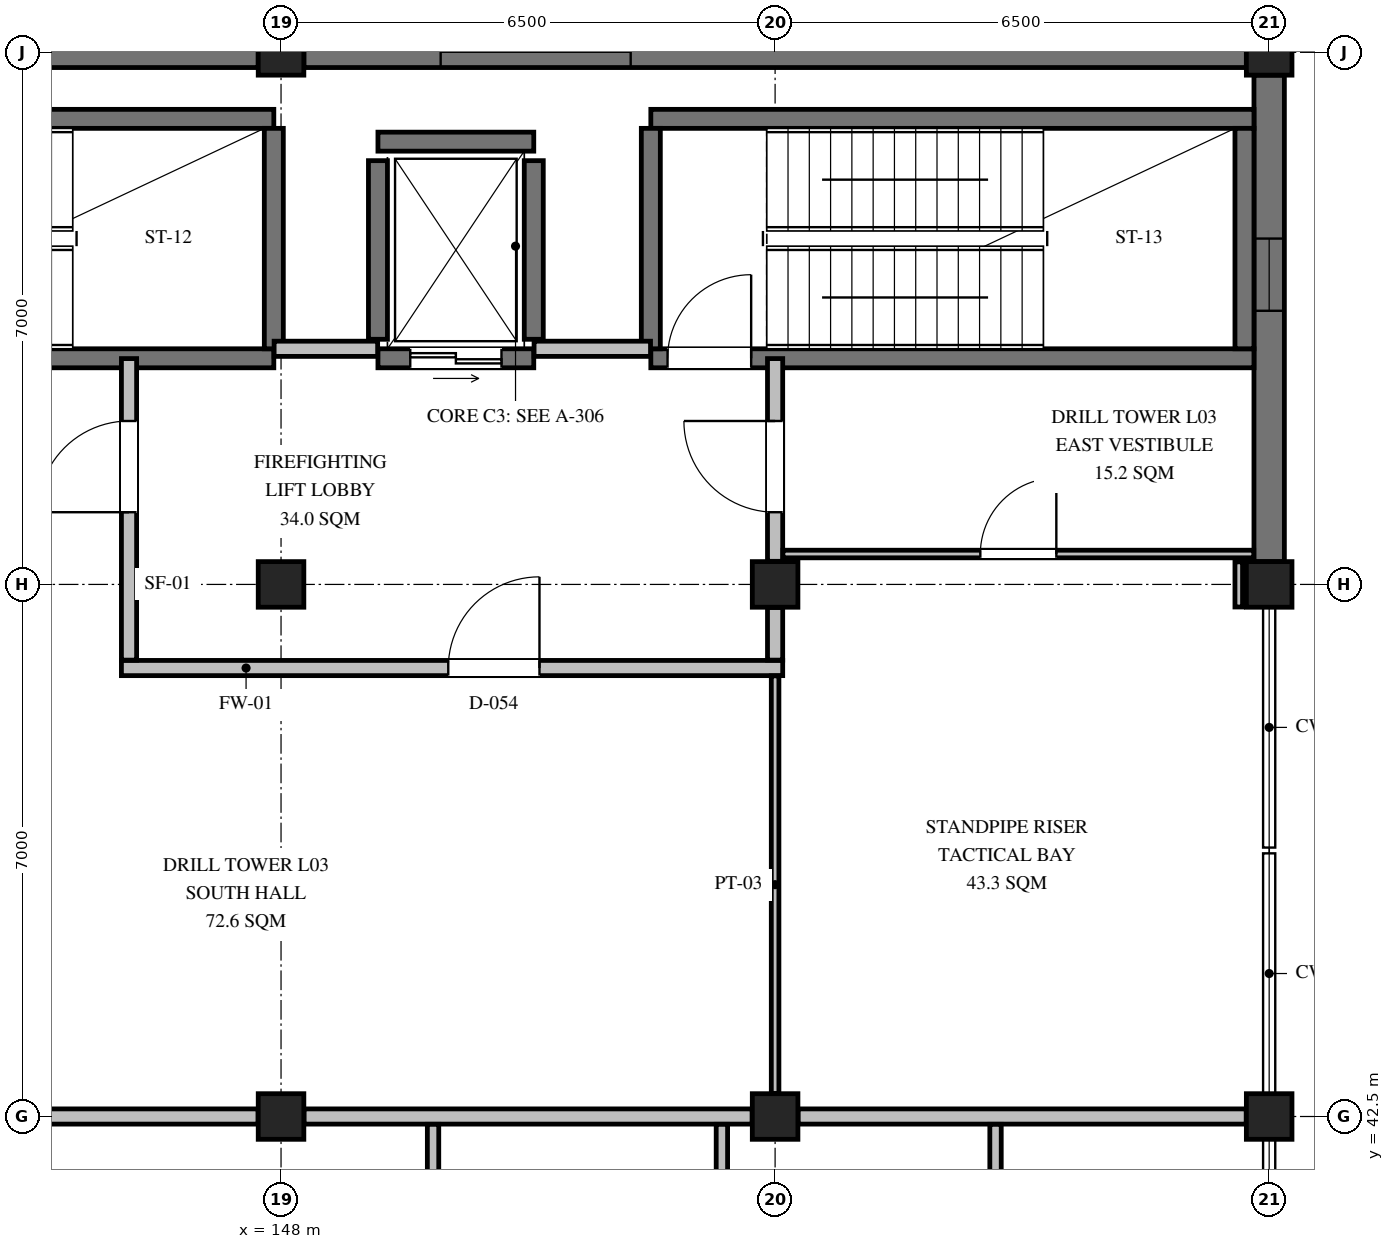
"""IFC4 building model, lengths in metres.
Left out: names, types, materials, properties, quantities, classifications, styles, units other than length and angle.
Written with IfcOpenShell. Run it as: python <this file> out.ifc"""

import sys

from ifc_helpers import new_model, si_unit, direction, frame, frame_2d, origin, origin_2d, place, context, subcontext, project, spatial, rectangle, extrude, element, fill, save


model = new_model("IFC4")
c1 = context("Model", 3, precision=1e-05, world=origin(), true_north=direction((0.0, 1.0)))
c2 = subcontext(c1, "Body", "Model", "MODEL_VIEW")
j1 = project(units=[si_unit("LENGTHUNIT", "METRE"), si_unit("PLANEANGLEUNIT", "RADIAN")], contexts=[c1])
p1 = place(None, origin())
s1 = spatial("IfcSite", under=j1, at=p1, CompositionType="ELEMENT")
p2 = place(p1, origin())
s2 = spatial("IfcBuilding", under=s1, at=p2, CompositionType="ELEMENT")
p3 = place(p2, frame((0.0, 0.0, 10.05)))
s3 = spatial("IfcBuildingStorey", under=s2, at=p3, CompositionType="ELEMENT", Elevation=10.05)
for number, where, z_axis, x_axis in (
    (1, (148.0, 42.5, 0.0), (0.0, 0.0, 1.0), (1.0, 0.0, 0.0)),
    (2, (148.0, 49.5, 0.0), (0.0, 0.0, 1.0), (1.0, 0.0, 0.0)),
    (3, (148.0, 56.5, 0.0), (0.0, 0.0, 1.0), (1.0, 0.0, 0.0)),
    (4, (154.5, 42.5, 0.0), (0.0, 0.0, 1.0), (1.0, 0.0, 0.0)),
    (5, (154.5, 49.5, 0.0), (0.0, 0.0, 1.0), (1.0, 0.0, 0.0)),
    (6, (161.0, 42.5, 0.0), (0.0, 0.0, 1.0), (1.0, 0.0, 0.0)),
    (7, (161.0, 49.5, 0.0), (0.0, 0.0, 1.0), (1.0, 0.0, 0.0)),
    (8, (161.0, 56.5, 0.0), (0.0, 0.0, 1.0), (1.0, 0.0, 0.0)),
):
    element("IfcColumn", number, at=place(p3, frame(where, z_axis=z_axis, x_axis=x_axis)), inside=s3, PredefinedType="COLUMN", context=c2, shape_type="SweptSolid", body=[
        extrude(rectangle(XDim=0.6, YDim=0.6, at=origin_2d()), origin(), (0.0, 0.0, 1.0), 4.2),
    ])
p4 = place(p3, frame((140.3, 56.5, 0.0), z_axis=(0.0, 0.0, 1.0), x_axis=(1.0, 0.0, 0.0)))
e9 = element("IfcWall", 9, at=p4, inside=s3, PredefinedType="SHEAR", context=c2, shape_type="SweptSolid", body=[
    extrude(rectangle(XDim=7.4, YDim=0.4, at=frame_2d((3.7, 0.0))), origin(), (0.0, 0.0, 1.0), 4.0),
])
p5 = place(p4, frame((1.8, 0.0, 0.9)))
e10 = element("IfcOpeningElement", 10, at=p5, cuts=e9, PredefinedType="OPENING", context=c2, shape_type="SweptSolid", body=[
    extrude(rectangle(XDim=2.1, YDim=2.1, at=frame_2d((1.05, 1.05))), frame((0.0, 0.21, 0.0), z_axis=(0.0, -1.0, 0.0), x_axis=(1.0, 0.0, 0.0)), (0.0, 0.0, 1.0), 0.42),
])
p6 = place(p3, frame((148.3, 56.5, 0.0), z_axis=(0.0, 0.0, 1.0), x_axis=(1.0, 0.0, 0.0)))
e11 = element("IfcWall", 11, at=p6, inside=s3, PredefinedType="SHEAR", context=c2, shape_type="SweptSolid", body=[
    extrude(rectangle(XDim=12.4, YDim=0.4, at=frame_2d((6.2, 0.0))), origin(), (0.0, 0.0, 1.0), 4.0),
])
p7 = place(p6, frame((1.8, 0.0, 0.9)))
e12 = element("IfcOpeningElement", 12, at=p7, cuts=e11, PredefinedType="OPENING", context=c2, shape_type="SweptSolid", body=[
    extrude(rectangle(XDim=2.5, YDim=2.1, at=frame_2d((1.25, 1.05))), frame((0.0, 0.21, 0.0), z_axis=(0.0, -1.0, 0.0), x_axis=(1.0, 0.0, 0.0)), (0.0, 0.0, 1.0), 0.42),
])
p8 = place(p3, frame((161.0, 49.8, 0.0), z_axis=(0.0, 0.0, 1.0), x_axis=(0.0, 1.0, 0.0)))
e13 = element("IfcWall", 13, at=p8, inside=s3, PredefinedType="SHEAR", context=c2, shape_type="SweptSolid", body=[
    extrude(rectangle(XDim=6.4, YDim=0.4, at=frame_2d((3.2, 0.0))), origin(), (0.0, 0.0, 1.0), 4.0),
])
p9 = place(p8, frame((3.3, 0.0, 1.1)))
e14 = element("IfcOpeningElement", 14, at=p9, cuts=e13, PredefinedType="OPENING", context=c2, shape_type="SweptSolid", body=[
    extrude(rectangle(XDim=0.95, YDim=0.95, at=frame_2d((0.475, 0.475))), frame((0.0, 0.21, 0.0), z_axis=(0.0, -1.0, 0.0), x_axis=(1.0, 0.0, 0.0)), (0.0, 0.0, 1.0), 0.42),
])
p10 = place(p3, frame((140.095, 52.475, 0.0), z_axis=(0.0, 0.0, 1.0), x_axis=(1.0, 0.0, 0.0)))
e15 = element("IfcWall", 15, at=p10, inside=s3, PredefinedType="SHEAR", context=c2, shape_type="SweptSolid", body=[
    extrude(rectangle(XDim=7.81, YDim=0.25, at=frame_2d((3.905, 0.0))), origin(), (0.0, 0.0, 1.0), 4.0),
])
p11 = place(p10, frame((0.22, 0.0, 0.0)))
e16 = element("IfcOpeningElement", 16, at=p11, cuts=e15, PredefinedType="OPENING", context=c2, shape_type="SweptSolid", body=[
    extrude(rectangle(XDim=1.1, YDim=2.15, at=frame_2d((0.55, 1.075))), frame((0.0, 0.135, 0.0), z_axis=(0.0, -1.0, 0.0), x_axis=(1.0, 0.0, 0.0)), (0.0, 0.0, 1.0), 0.27),
])
p12 = place(p3, frame((140.095, 55.625, 0.0), z_axis=(0.0, 0.0, 1.0), x_axis=(1.0, 0.0, 0.0)))
e17 = element("IfcWall", 17, at=p12, inside=s3, PredefinedType="SHEAR", context=c2, shape_type="SweptSolid", body=[
    extrude(rectangle(XDim=7.81, YDim=0.25, at=frame_2d((3.905, 0.0))), origin(), (0.0, 0.0, 1.0), 4.0),
])
p13 = place(p3, frame((147.905, 52.6, 0.0), z_axis=(0.0, 0.0, 1.0), x_axis=(0.0, 1.0, 0.0)))
e18 = element("IfcWall", 18, at=p13, inside=s3, PredefinedType="SHEAR", context=c2, shape_type="SweptSolid", body=[
    extrude(rectangle(XDim=2.9, YDim=0.25, at=frame_2d((1.45, 0.0))), origin(), (0.0, 0.0, 1.0), 4.0),
])
p14 = place(p3, frame((152.865, 52.475, 0.0), z_axis=(0.0, 0.0, 1.0), x_axis=(1.0, 0.0, 0.0)))
e19 = element("IfcWall", 19, at=p14, inside=s3, PredefinedType="SHEAR", context=c2, shape_type="SweptSolid", body=[
    extrude(rectangle(XDim=7.935, YDim=0.25, at=frame_2d((3.968, 0.0))), origin(), (0.0, 0.0, 1.0), 4.0),
])
p15 = place(p14, frame((0.22, 0.0, 0.0)))
e20 = element("IfcOpeningElement", 20, at=p15, cuts=e19, PredefinedType="OPENING", context=c2, shape_type="SweptSolid", body=[
    extrude(rectangle(XDim=1.1, YDim=2.15, at=frame_2d((0.55, 1.075))), frame((0.0, 0.135, 0.0), z_axis=(0.0, -1.0, 0.0), x_axis=(1.0, 0.0, 0.0)), (0.0, 0.0, 1.0), 0.27),
])
p16 = place(p3, frame((152.865, 55.625, 0.0), z_axis=(0.0, 0.0, 1.0), x_axis=(1.0, 0.0, 0.0)))
e21 = element("IfcWall", 21, at=p16, inside=s3, PredefinedType="SHEAR", context=c2, shape_type="SweptSolid", body=[
    extrude(rectangle(XDim=7.935, YDim=0.25, at=frame_2d((3.968, 0.0))), origin(), (0.0, 0.0, 1.0), 4.0),
])
for number, where, z_axis, x_axis in (
    (22, (152.865, 52.6, 0.0), (0.0, 0.0, 1.0), (0.0, 1.0, 0.0)),
    (23, (160.675, 52.6, 0.0), (0.0, 0.0, 1.0), (0.0, 1.0, 0.0)),
):
    element("IfcWall", number, at=place(p3, frame(where, z_axis=z_axis, x_axis=x_axis)), inside=s3, PredefinedType="SHEAR", context=c2, shape_type="SweptSolid", body=[
        extrude(rectangle(XDim=2.9, YDim=0.25, at=frame_2d((1.45, 0.0))), origin(), (0.0, 0.0, 1.0), 4.0),
    ])
p17 = place(p3, frame((149.275, 52.475, 0.0), z_axis=(0.0, 0.0, 1.0), x_axis=(1.0, 0.0, 0.0)))
e24 = element("IfcWall", 24, at=p17, inside=s3, PredefinedType="SHEAR", context=c2, shape_type="SweptSolid", body=[
    extrude(rectangle(XDim=2.05, YDim=0.25, at=frame_2d((1.025, 0.0))), origin(), (0.0, 0.0, 1.0), 4.0),
])
p18 = place(p17, frame((0.425, 0.0, 0.0)))
e25 = element("IfcOpeningElement", 25, at=p18, cuts=e24, PredefinedType="OPENING", context=c2, shape_type="SweptSolid", body=[
    extrude(rectangle(XDim=1.2, YDim=2.15, at=frame_2d((0.6, 1.075))), frame((0.0, 0.135, 0.0), z_axis=(0.0, -1.0, 0.0), x_axis=(1.0, 0.0, 0.0)), (0.0, 0.0, 1.0), 0.27),
])
p19 = place(p3, frame((149.275, 55.325, 0.0), z_axis=(0.0, 0.0, 1.0), x_axis=(1.0, 0.0, 0.0)))
e26 = element("IfcWall", 26, at=p19, inside=s3, PredefinedType="SHEAR", context=c2, shape_type="SweptSolid", body=[
    extrude(rectangle(XDim=2.05, YDim=0.25, at=frame_2d((1.025, 0.0))), origin(), (0.0, 0.0, 1.0), 4.0),
])
for number, where, z_axis, x_axis in (
    (27, (149.275, 52.725, 0.0), (0.0, 0.0, 1.0), (0.0, 1.0, 0.0)),
    (28, (151.325, 52.725, 0.0), (0.0, 0.0, 1.0), (0.0, 1.0, 0.0)),
):
    element("IfcWall", number, at=place(p3, frame(where, z_axis=z_axis, x_axis=x_axis)), inside=s3, PredefinedType="SHEAR", context=c2, shape_type="SweptSolid", body=[
        extrude(rectangle(XDim=2.35, YDim=0.25, at=frame_2d((1.175, 0.0))), origin(), (0.0, 0.0, 1.0), 4.0),
    ])
p20 = place(p3, frame((140.302, 42.5, 0.0), z_axis=(0.0, 0.0, 1.0), x_axis=(1.0, 0.0, 0.0)))
e29 = element("IfcWall", 29, at=p20, inside=s3, PredefinedType="PARTITIONING", context=c2, shape_type="SweptSolid", body=[
    extrude(rectangle(XDim=7.396, YDim=0.2, at=frame_2d((3.698, 0.0))), origin(), (0.0, 0.0, 1.0), 3.494),
])
p21 = place(p20, frame((3.298, 0.0, 0.0)))
e30 = element("IfcOpeningElement", 30, at=p21, cuts=e29, PredefinedType="OPENING", context=c2, shape_type="SweptSolid", body=[
    extrude(rectangle(XDim=1.2, YDim=2.15, at=frame_2d((0.6, 1.075))), frame((0.0, 0.11, 0.0), z_axis=(0.0, -1.0, 0.0), x_axis=(1.0, 0.0, 0.0)), (0.0, 0.0, 1.0), 0.22),
])
p22 = place(p3, frame((148.302, 42.5, 0.0), z_axis=(0.0, 0.0, 1.0), x_axis=(1.0, 0.0, 0.0)))
e31 = element("IfcWall", 31, at=p22, inside=s3, PredefinedType="PARTITIONING", context=c2, shape_type="SweptSolid", body=[
    extrude(rectangle(XDim=5.896, YDim=0.2, at=frame_2d((2.948, 0.0))), origin(), (0.0, 0.0, 1.0), 3.554),
])
p23 = place(p3, frame((154.802, 42.5, 0.0), z_axis=(0.0, 0.0, 1.0), x_axis=(1.0, 0.0, 0.0)))
e32 = element("IfcWall", 32, at=p23, inside=s3, PredefinedType="PARTITIONING", context=c2, shape_type="SweptSolid", body=[
    extrude(rectangle(XDim=5.896, YDim=0.2, at=frame_2d((2.948, 0.0))), origin(), (0.0, 0.0, 1.0), 3.604),
])
p24 = place(p3, frame((147.909, 52.6, 0.0), z_axis=(0.0, 0.0, 1.0), x_axis=(1.0, 0.0, 0.0)))
e33 = element("IfcWall", 33, at=p24, inside=s3, PredefinedType="PARTITIONING", context=c2, shape_type="SweptSolid", body=[
    extrude(rectangle(XDim=1.362, YDim=0.2, at=frame_2d((0.681, 0.0))), origin(), (0.0, 0.0, 1.0), 4.0),
])
p25 = place(p3, frame((151.329, 52.6, 0.0), z_axis=(0.0, 0.0, 1.0), x_axis=(1.0, 0.0, 0.0)))
e34 = element("IfcWall", 34, at=p25, inside=s3, PredefinedType="PARTITIONING", context=c2, shape_type="SweptSolid", body=[
    extrude(rectangle(XDim=1.532, YDim=0.2, at=frame_2d((0.766, 0.0))), origin(), (0.0, 0.0, 1.0), 4.0),
])
p26 = place(p3, frame((145.9, 48.4, 0.0), z_axis=(0.0, 0.0, 1.0), x_axis=(1.0, 0.0, 0.0)))
e35 = element("IfcWall", 35, at=p26, inside=s3, PredefinedType="PARTITIONING", context=c2, shape_type="SweptSolid", body=[
    extrude(rectangle(XDim=8.7, YDim=0.2, at=frame_2d((4.35, 0.0))), origin(), (0.0, 0.0, 1.0), 4.0),
])
p27 = place(p26, frame((4.3, 0.0, 0.0)))
e36 = element("IfcOpeningElement", 36, at=p27, cuts=e35, PredefinedType="OPENING", context=c2, shape_type="SweptSolid", body=[
    extrude(rectangle(XDim=1.2, YDim=2.15, at=frame_2d((0.6, 1.075))), frame((0.0, 0.11, 0.0), z_axis=(0.0, -1.0, 0.0), x_axis=(1.0, 0.0, 0.0)), (0.0, 0.0, 1.0), 0.22),
])
p28 = place(p3, frame((146.0, 48.504, 0.0), z_axis=(0.0, 0.0, 1.0), x_axis=(0.0, 1.0, 0.0)))
e37 = element("IfcWall", 37, at=p28, inside=s3, PredefinedType="PARTITIONING", context=c2, shape_type="SweptSolid", body=[
    extrude(rectangle(XDim=3.967, YDim=0.2, at=frame_2d((1.983, 0.0))), origin(), (0.0, 0.0, 1.0), 4.0),
])
p29 = place(p28, frame((1.946, 0.0, 0.0)))
e38 = element("IfcOpeningElement", 38, at=p29, cuts=e37, PredefinedType="OPENING", context=c2, shape_type="SweptSolid", body=[
    extrude(rectangle(XDim=1.2, YDim=2.15, at=frame_2d((0.6, 1.075))), frame((0.0, 0.11, 0.0), z_axis=(0.0, -1.0, 0.0), x_axis=(1.0, 0.0, 0.0)), (0.0, 0.0, 1.0), 0.22),
])
p30 = place(p3, frame((154.5, 48.504, 0.0), z_axis=(0.0, 0.0, 1.0), x_axis=(0.0, 1.0, 0.0)))
e39 = element("IfcWall", 39, at=p30, inside=s3, PredefinedType="PARTITIONING", context=c2, shape_type="SweptSolid", body=[
    extrude(rectangle(XDim=0.692, YDim=0.2, at=frame_2d((0.346, 0.0))), origin(), (0.0, 0.0, 1.0), 3.494),
])
p31 = place(p3, frame((154.5, 49.804, 0.0), z_axis=(0.0, 0.0, 1.0), x_axis=(0.0, 1.0, 0.0)))
e40 = element("IfcWall", 40, at=p31, inside=s3, PredefinedType="PARTITIONING", context=c2, shape_type="SweptSolid", body=[
    extrude(rectangle(XDim=2.667, YDim=0.2, at=frame_2d((1.333, 0.0))), origin(), (0.0, 0.0, 1.0), 4.0),
])
p32 = place(p31, frame((0.646, 0.0, 0.0)))
e41 = element("IfcOpeningElement", 41, at=p32, cuts=e40, PredefinedType="OPENING", context=c2, shape_type="SweptSolid", body=[
    extrude(rectangle(XDim=1.2, YDim=2.15, at=frame_2d((0.6, 1.075))), frame((0.0, 0.11, 0.0), z_axis=(0.0, -1.0, 0.0), x_axis=(1.0, 0.0, 0.0)), (0.0, 0.0, 1.0), 0.22),
])
p33 = place(p3, frame((150.0, 36.278, 0.0), z_axis=(0.0, 0.0, 1.0), x_axis=(0.0, 1.0, 0.0)))
e42 = element("IfcWall", 42, at=p33, inside=s3, PredefinedType="PARTITIONING", context=c2, shape_type="SweptSolid", body=[
    extrude(rectangle(XDim=6.119, YDim=0.15, at=frame_2d((3.06, 0.0))), origin(), (0.0, 0.0, 1.0), 3.75),
])
for number, where, z_axis, x_axis in (
    (43, (153.8, 36.278, 0.0), (0.0, 0.0, 1.0), (0.0, 1.0, 0.0)),
    (44, (157.4, 36.278, 0.0), (0.0, 0.0, 1.0), (0.0, 1.0, 0.0)),
):
    element("IfcWall", number, at=place(p3, frame(where, z_axis=z_axis, x_axis=x_axis)), inside=s3, PredefinedType="PARTITIONING", context=c2, shape_type="SweptSolid", body=[
        extrude(rectangle(XDim=6.119, YDim=0.15, at=frame_2d((3.06, 0.0))), origin(), (0.0, 0.0, 1.0), 4.0),
    ])
p34 = place(p3, frame((154.603, 49.9, 0.0), z_axis=(0.0, 0.0, 1.0), x_axis=(1.0, 0.0, 0.0)))
e45 = element("IfcWall", 45, at=p34, inside=s3, PredefinedType="PARTITIONING", context=c2, shape_type="SweptSolid", body=[
    extrude(rectangle(XDim=6.194, YDim=0.1, at=frame_2d((3.097, 0.0))), origin(), (0.0, 0.0, 1.0), 4.0),
])
p35 = place(p34, frame((2.597, 0.0, 0.0)))
e46 = element("IfcOpeningElement", 46, at=p35, cuts=e45, PredefinedType="OPENING", context=c2, shape_type="SweptSolid", body=[
    extrude(rectangle(XDim=1.0, YDim=2.1, at=frame_2d((0.5, 1.05))), frame((0.0, 0.06, 0.0), z_axis=(0.0, -1.0, 0.0), x_axis=(1.0, 0.0, 0.0)), (0.0, 0.0, 1.0), 0.12),
])
p36 = place(p3, frame((154.5, 42.803, 0.0), z_axis=(0.0, 0.0, 1.0), x_axis=(0.0, 1.0, 0.0)))
e47 = element("IfcWall", 47, at=p36, inside=s3, PredefinedType="PARTITIONING", context=c2, shape_type="SweptSolid", body=[
    extrude(rectangle(XDim=5.494, YDim=0.1, at=frame_2d((2.747, 0.0))), origin(), (0.0, 0.0, 1.0), 3.494),
])
p37 = place(p3, frame((160.6, 49.203, 0.0), z_axis=(0.0, 0.0, 1.0), x_axis=(0.0, 1.0, 0.0)))
e48 = element("IfcWall", 48, at=p37, inside=s3, PredefinedType="PARTITIONING", context=c2, shape_type="SweptSolid", body=[
    extrude(rectangle(XDim=0.594, YDim=0.1, at=frame_2d((0.297, 0.0))), origin(), (0.0, 0.0, 1.0), 4.0),
])
p38 = place(p7, origin())
e49 = element("IfcWindow", 49, at=p38, inside=s3, PartitioningType="SINGLE_PANEL", PredefinedType="WINDOW", context=c2, shape_type="SweptSolid", body=[
    extrude(rectangle(XDim=2.5, YDim=2.1, at=frame_2d((1.25, 1.05))), frame((0.0, 0.03, 0.0), z_axis=(0.0, -1.0, 0.0), x_axis=(1.0, 0.0, 0.0)), (0.0, 0.0, 1.0), 0.06),
])
fill(e12, e49)
p39 = place(p9, origin())
e50 = element("IfcWindow", 50, at=p39, inside=s3, PartitioningType="SINGLE_PANEL", PredefinedType="WINDOW", context=c2, shape_type="SweptSolid", body=[
    extrude(rectangle(XDim=0.95, YDim=0.95, at=frame_2d((0.475, 0.475))), frame((0.0, 0.03, 0.0), z_axis=(0.0, -1.0, 0.0), x_axis=(1.0, 0.0, 0.0)), (0.0, 0.0, 1.0), 0.06),
])
fill(e14, e50)
p40 = place(p15, frame((1.1, 0.0, 0.0), z_axis=(0.0, 0.0, 1.0), x_axis=(-1.0, 0.0, 0.0)))
e51 = element("IfcDoor", 51, at=p40, inside=s3, OperationType="SINGLE_SWING_RIGHT", PredefinedType="DOOR", context=c2, shape_type="SweptSolid", body=[
    extrude(rectangle(XDim=1.1, YDim=2.15, at=frame_2d((0.55, 1.075))), frame((0.0, 0.025, 0.0), z_axis=(0.0, -1.0, 0.0), x_axis=(1.0, 0.0, 0.0)), (0.0, 0.0, 1.0), 0.05),
])
fill(e20, e51)
p41 = place(p18, origin())
e52 = element("IfcDoor", 52, at=p41, inside=s3, OperationType="DOUBLE_DOOR_SLIDING", PredefinedType="DOOR", context=c2, shape_type="SweptSolid", body=[
    extrude(rectangle(XDim=1.2, YDim=2.15, at=frame_2d((0.6, 1.075))), frame((0.0, 0.025, 0.0), z_axis=(0.0, -1.0, 0.0), x_axis=(1.0, 0.0, 0.0)), (0.0, 0.0, 1.0), 0.05),
])
fill(e25, e52)
p42 = place(p27, origin())
e53 = element("IfcDoor", 53, at=p42, inside=s3, OperationType="SINGLE_SWING_RIGHT", PredefinedType="DOOR", context=c2, shape_type="SweptSolid", body=[
    extrude(rectangle(XDim=1.2, YDim=2.15, at=frame_2d((0.6, 1.075))), frame((0.0, 0.025, 0.0), z_axis=(0.0, -1.0, 0.0), x_axis=(1.0, 0.0, 0.0)), (0.0, 0.0, 1.0), 0.05),
])
fill(e36, e53)
p43 = place(p29, origin())
e54 = element("IfcDoor", 54, at=p43, inside=s3, OperationType="SINGLE_SWING_LEFT", PredefinedType="DOOR", context=c2, shape_type="SweptSolid", body=[
    extrude(rectangle(XDim=1.2, YDim=2.15, at=frame_2d((0.6, 1.075))), frame((0.0, 0.025, 0.0), z_axis=(0.0, -1.0, 0.0), x_axis=(1.0, 0.0, 0.0)), (0.0, 0.0, 1.0), 0.05),
])
fill(e38, e54)
p44 = place(p32, origin())
e55 = element("IfcDoor", 55, at=p44, inside=s3, OperationType="SINGLE_SWING_RIGHT", PredefinedType="DOOR", context=c2, shape_type="SweptSolid", body=[
    extrude(rectangle(XDim=1.2, YDim=2.15, at=frame_2d((0.6, 1.075))), frame((0.0, 0.025, 0.0), z_axis=(0.0, -1.0, 0.0), x_axis=(1.0, 0.0, 0.0)), (0.0, 0.0, 1.0), 0.05),
])
fill(e41, e55)
p45 = place(p35, origin())
e56 = element("IfcDoor", 56, at=p45, inside=s3, OperationType="SINGLE_SWING_RIGHT", PredefinedType="DOOR", context=c2, shape_type="SweptSolid", body=[
    extrude(rectangle(XDim=1.0, YDim=2.1, at=frame_2d((0.5, 1.05))), frame((0.0, 0.025, 0.0), z_axis=(0.0, -1.0, 0.0), x_axis=(1.0, 0.0, 0.0)), (0.0, 0.0, 1.0), 0.05),
])
fill(e46, e56)
save(model, sys.argv[1])
